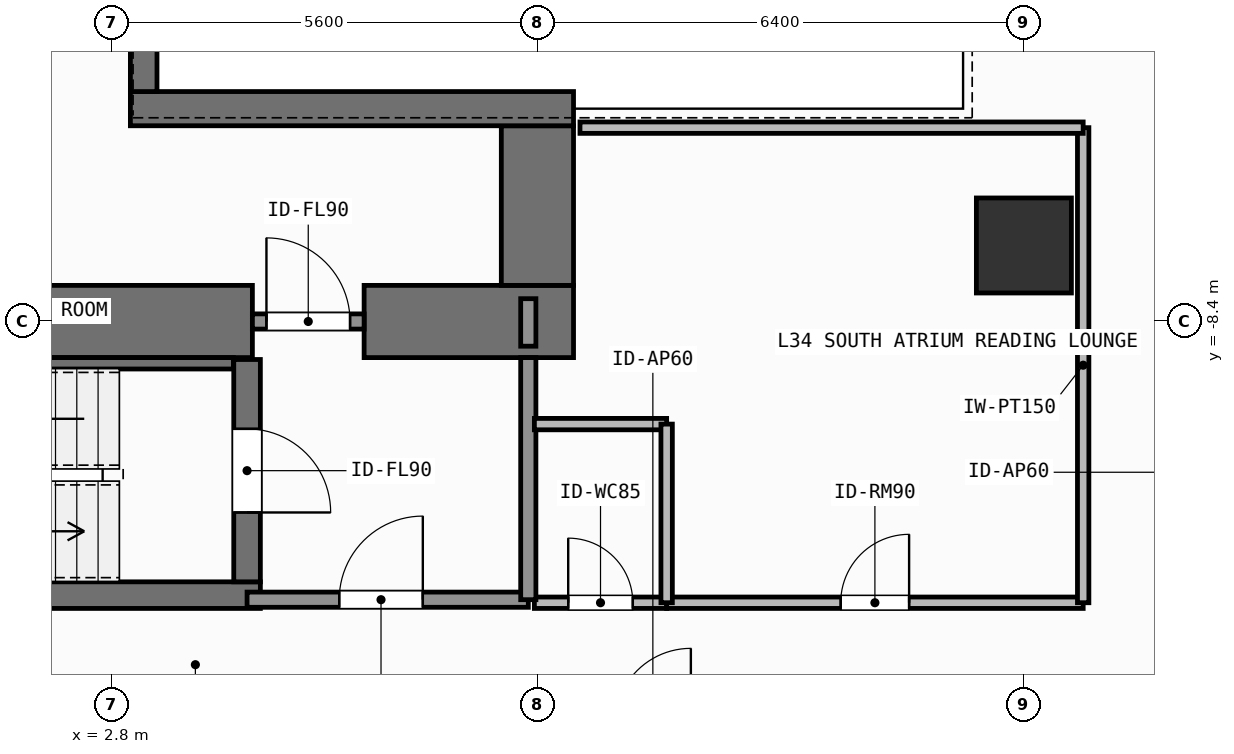
"""IFC4 building model, lengths in metres.
Left out: names, types, materials, properties, quantities, classifications, styles, units other than length and angle.
Written with IfcOpenShell. Run it as: python <this file> out.ifc"""

import sys

from ifc_helpers import new_model, si_unit, direction, frame, frame_2d, origin, origin_2d, place, context, subcontext, project, spatial, rectangle, extrude, element, fill, save


model = new_model("IFC4")
c1 = context("Model", 3, precision=1e-05, world=origin(), true_north=direction((0.0, 1.0)))
c2 = subcontext(c1, "Body", "Model", "MODEL_VIEW")
j1 = project(units=[si_unit("LENGTHUNIT", "METRE"), si_unit("PLANEANGLEUNIT", "RADIAN")], contexts=[c1])
p1 = place(None, origin())
s1 = spatial("IfcSite", under=j1, at=p1, CompositionType="ELEMENT")
p2 = place(p1, origin())
s2 = spatial("IfcBuilding", under=s1, at=p2, CompositionType="ELEMENT")
p3 = place(p2, frame((0.0, 0.0, 136.8)))
s3 = spatial("IfcBuildingStorey", under=s2, at=p3, CompositionType="ELEMENT", Elevation=136.8)
p4 = place(p3, frame((-2.62, -8.4, 0.0), z_axis=(0.0, 0.0, 1.0), x_axis=(1.0, 0.0, 0.0)))
e1 = element("IfcWall", 1, at=p4, inside=s3, PredefinedType="SHEAR", context=c2, shape_type="SweptSolid", body=[
    extrude(rectangle(XDim=7.27, YDim=0.95, at=frame_2d((3.635, 0.0))), origin(), (0.0, 0.0, 1.0), 3.9),
])
p5 = place(p3, frame((6.12, -8.4, 0.0), z_axis=(0.0, 0.0, 1.0), x_axis=(1.0, 0.0, 0.0)))
e2 = element("IfcWall", 2, at=p5, inside=s3, PredefinedType="SHEAR", context=c2, shape_type="SweptSolid", body=[
    extrude(rectangle(XDim=2.755, YDim=0.95, at=frame_2d((1.377, 0.0))), origin(), (0.0, 0.0, 1.0), 3.9),
])
p6 = place(p3, frame((8.4, -7.925, 0.0), z_axis=(0.0, 0.0, 1.0), x_axis=(0.0, 1.0, 0.0)))
e3 = element("IfcWall", 3, at=p6, inside=s3, PredefinedType="SHEAR", context=c2, shape_type="SweptSolid", body=[
    extrude(rectangle(XDim=2.1, YDim=0.95, at=frame_2d((1.05, 0.0))), origin(), (0.0, 0.0, 1.0), 3.9),
])
p7 = place(p3, frame((3.045, -5.6, 0.0), z_axis=(0.0, 0.0, 1.0), x_axis=(1.0, 0.0, 0.0)))
e4 = element("IfcWall", 4, at=p7, inside=s3, PredefinedType="SHEAR", context=c2, shape_type="SweptSolid", body=[
    extrude(rectangle(XDim=5.83, YDim=0.45, at=frame_2d((2.915, 0.0))), origin(), (0.0, 0.0, 1.0), 3.9),
])
p8 = place(p3, frame((3.22, -5.375, 0.0), z_axis=(0.0, 0.0, 1.0), x_axis=(0.0, 1.0, 0.0)))
e5 = element("IfcWall", 5, at=p8, inside=s3, PredefinedType="SHEAR", context=c2, shape_type="SweptSolid", body=[
    extrude(rectangle(XDim=10.75, YDim=0.35, at=frame_2d((5.375, 0.0))), origin(), (0.0, 0.0, 1.0), 3.9),
])
p9 = place(p3, frame((-2.555, -12.0, 0.0), z_axis=(0.0, 0.0, 1.0), x_axis=(1.0, 0.0, 0.0)))
e6 = element("IfcWall", 6, at=p9, inside=s3, PredefinedType="SHEAR", context=c2, shape_type="SweptSolid", body=[
    extrude(rectangle(XDim=7.31, YDim=0.35, at=frame_2d((3.655, 0.0))), origin(), (0.0, 0.0, 1.0), 3.9),
])
p10 = place(p3, frame((-2.2, -8.95, 0.0), z_axis=(0.0, 0.0, 1.0), x_axis=(1.0, 0.0, 0.0)))
e7 = element("IfcWall", 7, at=p10, inside=s3, PredefinedType="SHEAR", context=c2, shape_type="SweptSolid", body=[
    extrude(rectangle(XDim=6.6, YDim=0.15, at=frame_2d((3.3, 0.0))), origin(), (0.0, 0.0, 1.0), 3.9),
])
p11 = place(p3, frame((4.58, -8.9, 0.0), z_axis=(0.0, 0.0, 1.0), x_axis=(0.0, -1.0, 0.0)))
e8 = element("IfcWall", 8, at=p11, inside=s3, PredefinedType="SHEAR", context=c2, shape_type="SweptSolid", body=[
    extrude(rectangle(XDim=2.925, YDim=0.35, at=frame_2d((1.462, 0.0))), origin(), (0.0, 0.0, 1.0), 3.9),
])
p12 = place(p11, frame((0.913, 0.0, 0.0)))
e9 = element("IfcOpeningElement", 9, at=p12, cuts=e8, PredefinedType="OPENING", context=c2, shape_type="SweptSolid", body=[
    extrude(rectangle(XDim=1.1, YDim=2.15, at=frame_2d((0.55, 1.075))), frame((0.0, 0.185, 0.0), z_axis=(0.0, -1.0, 0.0), x_axis=(1.0, 0.0, 0.0)), (0.0, 0.0, 1.0), 0.37),
])
p13 = place(p3, frame((14.8, -7.4, 0.0), z_axis=(0.0, 0.0, 1.0), x_axis=(1.0, 0.0, 0.0)))
e10 = element("IfcColumn", 10, at=p13, inside=s3, PredefinedType="COLUMN", context=c2, shape_type="SweptSolid", body=[
    extrude(rectangle(XDim=1.25, YDim=1.25, at=origin_2d()), origin(), (0.0, 0.0, 1.0), 3.9),
])
p14 = place(p3, frame((4.58, -12.06, 0.0), z_axis=(0.0, 0.0, 1.0), x_axis=(1.0, 0.0, 0.0)))
e11 = element("IfcWall", 11, at=p14, inside=s3, PredefinedType="SOLIDWALL", context=c2, shape_type="SweptSolid", body=[
    extrude(rectangle(XDim=3.7, YDim=0.2, at=frame_2d((1.85, 0.0))), origin(), (0.0, 0.0, 1.0), 3.68),
])
p15 = place(p14, frame((1.212, 0.0, 0.0)))
e12 = element("IfcOpeningElement", 12, at=p15, cuts=e11, PredefinedType="OPENING", context=c2, shape_type="SweptSolid", body=[
    extrude(rectangle(XDim=1.1, YDim=2.15, at=frame_2d((0.55, 1.075))), frame((0.0, 0.11, 0.0), z_axis=(0.0, -1.0, 0.0), x_axis=(1.0, 0.0, 0.0)), (0.0, 0.0, 1.0), 0.22),
])
p16 = place(p3, frame((4.65, -8.4, 0.0), z_axis=(0.0, 0.0, 1.0), x_axis=(1.0, 0.0, 0.0)))
e13 = element("IfcWall", 13, at=p16, inside=s3, PredefinedType="SOLIDWALL", context=c2, shape_type="SweptSolid", body=[
    extrude(rectangle(XDim=1.47, YDim=0.2, at=frame_2d((0.735, 0.0))), origin(), (0.0, 0.0, 1.0), 2.72),
])
p17 = place(p16, frame((0.185, 0.0, 0.0)))
e14 = element("IfcOpeningElement", 14, at=p17, cuts=e13, PredefinedType="OPENING", context=c2, shape_type="SweptSolid", body=[
    extrude(rectangle(XDim=1.1, YDim=2.15, at=frame_2d((0.55, 1.075))), frame((0.0, 0.11, 0.0), z_axis=(0.0, -1.0, 0.0), x_axis=(1.0, 0.0, 0.0)), (0.0, 0.0, 1.0), 0.22),
])
p18 = place(p3, frame((8.36, -12.1, 0.0), z_axis=(0.0, 0.0, 1.0), x_axis=(1.0, 0.0, 0.0)))
e15 = element("IfcWall", 15, at=p18, inside=s3, PredefinedType="PARTITIONING", context=c2, shape_type="SweptSolid", body=[
    extrude(rectangle(XDim=1.74, YDim=0.15, at=frame_2d((0.87, 0.0))), origin(), (0.0, 0.0, 1.0), 3.68),
])
p19 = place(p18, frame((0.445, 0.0, 0.0)))
e16 = element("IfcOpeningElement", 16, at=p19, cuts=e15, PredefinedType="OPENING", context=c2, shape_type="SweptSolid", body=[
    extrude(rectangle(XDim=0.85, YDim=2.1, at=frame_2d((0.425, 1.05))), frame((0.0, 0.085, 0.0), z_axis=(0.0, -1.0, 0.0), x_axis=(1.0, 0.0, 0.0)), (0.0, 0.0, 1.0), 0.17),
])
p20 = place(p3, frame((10.1, -12.1, 0.0), z_axis=(0.0, 0.0, 1.0), x_axis=(1.0, 0.0, 0.0)))
e17 = element("IfcWall", 17, at=p20, inside=s3, PredefinedType="PARTITIONING", context=c2, shape_type="SweptSolid", body=[
    extrude(rectangle(XDim=5.48, YDim=0.15, at=frame_2d((2.74, 0.0))), origin(), (0.0, 0.0, 1.0), 3.68),
])
p21 = place(p20, frame((2.29, 0.0, 0.0)))
e18 = element("IfcOpeningElement", 18, at=p21, cuts=e17, PredefinedType="OPENING", context=c2, shape_type="SweptSolid", body=[
    extrude(rectangle(XDim=0.9, YDim=2.1, at=frame_2d((0.45, 1.05))), frame((0.0, 0.085, 0.0), z_axis=(0.0, -1.0, 0.0), x_axis=(1.0, 0.0, 0.0)), (0.0, 0.0, 1.0), 0.17),
])
p22 = place(p3, frame((8.28, -12.06, 0.0), z_axis=(0.0, 0.0, 1.0), x_axis=(0.0, 1.0, 0.0)))
e19 = element("IfcWall", 19, at=p22, inside=s3, PredefinedType="SOLIDWALL", context=c2, shape_type="SweptSolid", body=[
    extrude(rectangle(XDim=3.185, YDim=0.2, at=frame_2d((1.593, 0.0))), origin(), (0.0, 0.0, 1.0), 3.68),
])
p23 = place(p3, frame((8.28, -8.725, 0.0), z_axis=(0.0, 0.0, 1.0), x_axis=(0.0, 1.0, 0.0)))
e20 = element("IfcWall", 20, at=p23, inside=s3, PredefinedType="SOLIDWALL", context=c2, shape_type="SweptSolid", body=[
    extrude(rectangle(XDim=0.625, YDim=0.2, at=frame_2d((0.312, 0.0))), origin(), (0.0, 0.0, 1.0), 3.68),
])
p24 = place(p3, frame((8.36, -9.75, 0.0), z_axis=(0.0, 0.0, 1.0), x_axis=(1.0, 0.0, 0.0)))
e21 = element("IfcWall", 21, at=p24, inside=s3, PredefinedType="PARTITIONING", context=c2, shape_type="SweptSolid", body=[
    extrude(rectangle(XDim=1.74, YDim=0.15, at=frame_2d((0.87, 0.0))), origin(), (0.0, 0.0, 1.0), 3.68),
])
p25 = place(p3, frame((10.1, -12.1, 0.0), z_axis=(0.0, 0.0, 1.0), x_axis=(0.0, 1.0, 0.0)))
e22 = element("IfcWall", 22, at=p25, inside=s3, PredefinedType="PARTITIONING", context=c2, shape_type="SweptSolid", body=[
    extrude(rectangle(XDim=2.35, YDim=0.15, at=frame_2d((1.175, 0.0))), origin(), (0.0, 0.0, 1.0), 3.68),
])
p26 = place(p3, frame((15.58, -12.1, 0.0), z_axis=(0.0, 0.0, 1.0), x_axis=(0.0, 1.0, 0.0)))
e23 = element("IfcWall", 23, at=p26, inside=s3, PredefinedType="PARTITIONING", context=c2, shape_type="SweptSolid", body=[
    extrude(rectangle(XDim=6.25, YDim=0.15, at=frame_2d((3.125, 0.0))), origin(), (0.0, 0.0, 1.0), 3.68),
])
p27 = place(p3, frame((8.96, -5.85, 0.0), z_axis=(0.0, 0.0, 1.0), x_axis=(1.0, 0.0, 0.0)))
e24 = element("IfcWall", 24, at=p27, inside=s3, PredefinedType="PARTITIONING", context=c2, shape_type="SweptSolid", body=[
    extrude(rectangle(XDim=6.62, YDim=0.15, at=frame_2d((3.31, 0.0))), origin(), (0.0, 0.0, 1.0), 3.68),
])
p28 = place(p12, origin())
e25 = element("IfcDoor", 25, at=p28, inside=s3, OperationType="SINGLE_SWING_RIGHT", PredefinedType="DOOR", context=c2, shape_type="SweptSolid", body=[
    extrude(rectangle(XDim=1.1, YDim=2.15, at=frame_2d((0.55, 1.075))), frame((0.0, 0.025, 0.0), z_axis=(0.0, -1.0, 0.0), x_axis=(1.0, 0.0, 0.0)), (0.0, 0.0, 1.0), 0.05),
])
fill(e9, e25)
p29 = place(p15, origin())
e26 = element("IfcDoor", 26, at=p29, inside=s3, OperationType="SINGLE_SWING_RIGHT", PredefinedType="DOOR", context=c2, shape_type="SweptSolid", body=[
    extrude(rectangle(XDim=1.1, YDim=2.15, at=frame_2d((0.55, 1.075))), frame((0.0, 0.025, 0.0), z_axis=(0.0, -1.0, 0.0), x_axis=(1.0, 0.0, 0.0)), (0.0, 0.0, 1.0), 0.05),
])
fill(e12, e26)
p30 = place(p17, origin())
e27 = element("IfcDoor", 27, at=p30, inside=s3, OperationType="SINGLE_SWING_LEFT", PredefinedType="DOOR", context=c2, shape_type="SweptSolid", body=[
    extrude(rectangle(XDim=1.1, YDim=2.15, at=frame_2d((0.55, 1.075))), frame((0.0, 0.025, 0.0), z_axis=(0.0, -1.0, 0.0), x_axis=(1.0, 0.0, 0.0)), (0.0, 0.0, 1.0), 0.05),
])
fill(e14, e27)
p31 = place(p19, origin())
e28 = element("IfcDoor", 28, at=p31, inside=s3, OperationType="SINGLE_SWING_LEFT", PredefinedType="DOOR", context=c2, shape_type="SweptSolid", body=[
    extrude(rectangle(XDim=0.85, YDim=2.1, at=frame_2d((0.425, 1.05))), frame((0.0, 0.025, 0.0), z_axis=(0.0, -1.0, 0.0), x_axis=(1.0, 0.0, 0.0)), (0.0, 0.0, 1.0), 0.05),
])
fill(e16, e28)
p32 = place(p21, origin())
e29 = element("IfcDoor", 29, at=p32, inside=s3, OperationType="SINGLE_SWING_RIGHT", PredefinedType="DOOR", context=c2, shape_type="SweptSolid", body=[
    extrude(rectangle(XDim=0.9, YDim=2.1, at=frame_2d((0.45, 1.05))), frame((0.0, 0.025, 0.0), z_axis=(0.0, -1.0, 0.0), x_axis=(1.0, 0.0, 0.0)), (0.0, 0.0, 1.0), 0.05),
])
fill(e18, e29)
save(model, sys.argv[1])
